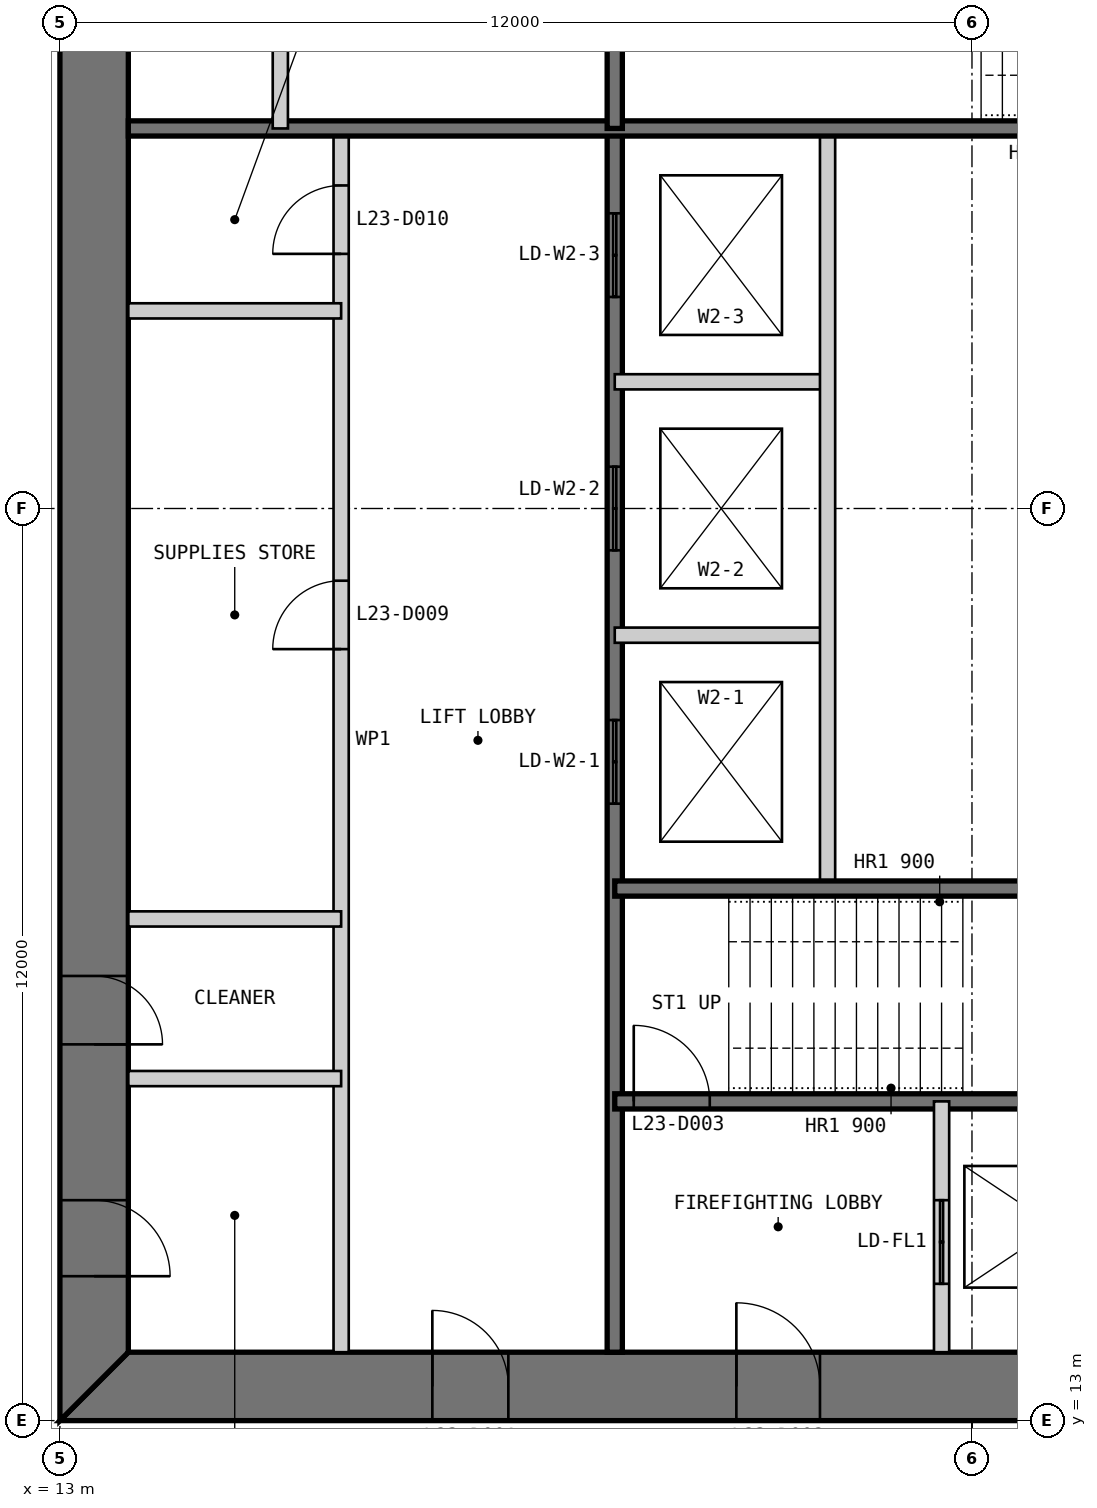
"""IFC4 building model, lengths in metres.
Left out: names, types, materials, properties, quantities, classifications, styles, units other than length and angle.
Written with IfcOpenShell. Run it as: python <this file> out.ifc"""

import sys

from ifc_helpers import new_model, si_unit, direction, frame, frame_2d, origin, place, context, subcontext, project, spatial, polyline, rectangle, outline, extrude, element, fill, save


model = new_model("IFC4")
c1 = context("Model", 3, precision=1e-05, world=origin(), true_north=direction((0.0, 1.0)))
c2 = subcontext(c1, "Body", "Model", "MODEL_VIEW")
j1 = project(units=[si_unit("LENGTHUNIT", "METRE"), si_unit("PLANEANGLEUNIT", "RADIAN")], contexts=[c1])
p1 = place(None, origin())
s1 = spatial("IfcSite", under=j1, at=p1, CompositionType="ELEMENT")
p2 = place(p1, origin())
s2 = spatial("IfcBuilding", under=s1, at=p2, CompositionType="ELEMENT")
p3 = place(p2, frame((0.0, 0.0, 102.4)))
s3 = spatial("IfcBuildingStorey", under=s2, at=p3, CompositionType="ELEMENT", Elevation=102.4)
p4 = place(p3, frame((13.0, 13.45, 0.0), z_axis=(0.0, 0.0, 1.0), x_axis=(1.0, 0.0, 0.0)))
e1 = element("IfcWall", 1, at=p4, inside=s3, PredefinedType="SHEAR", context=c2, shape_type="SweptSolid", body=[
    extrude(outline(polyline([(0.0, -0.45), (24.0, -0.45), (23.1, 0.45), (0.9, 0.45), (0.0, -0.45)])), origin(), (0.0, 0.0, 1.0), 4.0),
])
p5 = place(p4, frame((4.9, 0.0, 0.0)))
e2 = element("IfcOpeningElement", 2, at=p5, cuts=e1, PredefinedType="OPENING", context=c2, shape_type="SweptSolid", body=[
    extrude(rectangle(XDim=1.0, YDim=2.2, at=frame_2d((0.5, 1.1))), frame((0.0, 0.46, 0.0), z_axis=(0.0, -1.0, 0.0), x_axis=(1.0, 0.0, 0.0)), (0.0, 0.0, 1.0), 0.92),
])
p6 = place(p4, frame((8.9, 0.0, 0.0)))
e3 = element("IfcOpeningElement", 3, at=p6, cuts=e1, PredefinedType="OPENING", context=c2, shape_type="SweptSolid", body=[
    extrude(rectangle(XDim=1.1, YDim=2.2, at=frame_2d((0.55, 1.1))), frame((0.0, 0.46, 0.0), z_axis=(0.0, -1.0, 0.0), x_axis=(1.0, 0.0, 0.0)), (0.0, 0.0, 1.0), 0.92),
])
p7 = place(p4, frame((15.05, 0.0, 0.0)))
e4 = element("IfcOpeningElement", 4, at=p7, cuts=e1, PredefinedType="OPENING", context=c2, shape_type="SweptSolid", body=[
    extrude(rectangle(XDim=0.9, YDim=2.2, at=frame_2d((0.45, 1.1))), frame((0.0, 0.46, 0.0), z_axis=(0.0, -1.0, 0.0), x_axis=(1.0, 0.0, 0.0)), (0.0, 0.0, 1.0), 0.92),
])
p8 = place(p4, frame((17.9, 0.0, 0.0)))
e5 = element("IfcOpeningElement", 5, at=p8, cuts=e1, PredefinedType="OPENING", context=c2, shape_type="SweptSolid", body=[
    extrude(rectangle(XDim=1.0, YDim=2.2, at=frame_2d((0.5, 1.1))), frame((0.0, 0.46, 0.0), z_axis=(0.0, -1.0, 0.0), x_axis=(1.0, 0.0, 0.0)), (0.0, 0.0, 1.0), 0.92),
])
p9 = place(p4, frame((21.4, 0.0, 0.0)))
e6 = element("IfcOpeningElement", 6, at=p9, cuts=e1, PredefinedType="OPENING", context=c2, shape_type="SweptSolid", body=[
    extrude(rectangle(XDim=1.0, YDim=2.2, at=frame_2d((0.5, 1.1))), frame((0.0, 0.46, 0.0), z_axis=(0.0, -1.0, 0.0), x_axis=(1.0, 0.0, 0.0)), (0.0, 0.0, 1.0), 0.92),
])
p10 = place(p3, frame((13.45, 36.1, 0.0), z_axis=(0.0, 0.0, 1.0), x_axis=(0.0, -1.0, 0.0)))
e7 = element("IfcWall", 7, at=p10, inside=s3, PredefinedType="SHEAR", context=c2, shape_type="SweptSolid", body=[
    extrude(outline(polyline([(-0.9, -0.45), (23.1, -0.45), (22.2, 0.45), (0.0, 0.45), (-0.9, -0.45)])), origin(), (0.0, 0.0, 1.0), 4.0),
])
p11 = place(p10, frame((20.2, 0.0, 0.0)))
e8 = element("IfcOpeningElement", 8, at=p11, cuts=e7, PredefinedType="OPENING", context=c2, shape_type="SweptSolid", body=[
    extrude(rectangle(XDim=1.0, YDim=2.2, at=frame_2d((0.5, 1.1))), frame((0.0, 0.46, 0.0), z_axis=(0.0, -1.0, 0.0), x_axis=(1.0, 0.0, 0.0)), (0.0, 0.0, 1.0), 0.92),
])
p12 = place(p10, frame((17.25, 0.0, 0.0)))
e9 = element("IfcOpeningElement", 9, at=p12, cuts=e7, PredefinedType="OPENING", context=c2, shape_type="SweptSolid", body=[
    extrude(rectangle(XDim=0.9, YDim=2.2, at=frame_2d((0.45, 1.1))), frame((0.0, 0.46, 0.0), z_axis=(0.0, -1.0, 0.0), x_axis=(1.0, 0.0, 0.0)), (0.0, 0.0, 1.0), 0.92),
])
p13 = place(p3, frame((16.7, 13.9, 0.0), z_axis=(0.0, 0.0, 1.0), x_axis=(0.0, 1.0, 0.0)))
e10 = element("IfcWall", 10, at=p13, inside=s3, PredefinedType="PARTITIONING", context=c2, shape_type="SweptSolid", body=[
    extrude(rectangle(XDim=16.1, YDim=0.2, at=frame_2d((8.05, 0.0))), origin(), (0.0, 0.0, 1.0), 3.8),
])
p14 = place(p13, frame((9.25, 0.0, 0.0)))
e11 = element("IfcOpeningElement", 11, at=p14, cuts=e10, PredefinedType="OPENING", context=c2, shape_type="SweptSolid", body=[
    extrude(rectangle(XDim=0.9, YDim=2.2, at=frame_2d((0.45, 1.1))), frame((0.0, 0.11, 0.0), z_axis=(0.0, -1.0, 0.0), x_axis=(1.0, 0.0, 0.0)), (0.0, 0.0, 1.0), 0.22),
])
p15 = place(p13, frame((14.45, 0.0, 0.0)))
e12 = element("IfcOpeningElement", 12, at=p15, cuts=e10, PredefinedType="OPENING", context=c2, shape_type="SweptSolid", body=[
    extrude(rectangle(XDim=0.9, YDim=2.2, at=frame_2d((0.45, 1.1))), frame((0.0, 0.11, 0.0), z_axis=(0.0, -1.0, 0.0), x_axis=(1.0, 0.0, 0.0)), (0.0, 0.0, 1.0), 0.22),
])
p16 = place(p3, frame((20.3, 13.9, 0.0), z_axis=(0.0, 0.0, 1.0), x_axis=(0.0, 1.0, 0.0)))
e13 = element("IfcWall", 13, at=p16, inside=s3, PredefinedType="SOLIDWALL", context=c2, shape_type="SweptSolid", body=[
    extrude(rectangle(XDim=16.1, YDim=0.2, at=frame_2d((8.05, 0.0))), origin(), (0.0, 0.0, 1.0), 3.8),
])
p17 = place(p16, frame((7.217, 0.0, 0.0)))
e14 = element("IfcOpeningElement", 14, at=p17, cuts=e13, PredefinedType="OPENING", context=c2, shape_type="SweptSolid", body=[
    extrude(rectangle(XDim=1.1, YDim=2.2, at=frame_2d((0.55, 1.1))), frame((0.0, 0.11, 0.0), z_axis=(0.0, -1.0, 0.0), x_axis=(1.0, 0.0, 0.0)), (0.0, 0.0, 1.0), 0.22),
])
p18 = place(p16, frame((10.55, 0.0, 0.0)))
e15 = element("IfcOpeningElement", 15, at=p18, cuts=e13, PredefinedType="OPENING", context=c2, shape_type="SweptSolid", body=[
    extrude(rectangle(XDim=1.1, YDim=2.2, at=frame_2d((0.55, 1.1))), frame((0.0, 0.11, 0.0), z_axis=(0.0, -1.0, 0.0), x_axis=(1.0, 0.0, 0.0)), (0.0, 0.0, 1.0), 0.22),
])
p19 = place(p16, frame((13.883, 0.0, 0.0)))
e16 = element("IfcOpeningElement", 16, at=p19, cuts=e13, PredefinedType="OPENING", context=c2, shape_type="SweptSolid", body=[
    extrude(rectangle(XDim=1.1, YDim=2.2, at=frame_2d((0.55, 1.1))), frame((0.0, 0.11, 0.0), z_axis=(0.0, -1.0, 0.0), x_axis=(1.0, 0.0, 0.0)), (0.0, 0.0, 1.0), 0.22),
])
for number, where, z_axis, x_axis in (
    (17, (20.3, 23.333, 0.0), (0.0, 0.0, 1.0), (1.0, 0.0, 0.0)),
    (18, (20.3, 26.667, 0.0), (0.0, 0.0, 1.0), (1.0, 0.0, 0.0)),
):
    element("IfcWall", number, at=place(p3, frame(where, z_axis=z_axis, x_axis=x_axis)), inside=s3, PredefinedType="PARTITIONING", context=c2, shape_type="SweptSolid", body=[
        extrude(rectangle(XDim=2.8, YDim=0.2, at=frame_2d((1.4, 0.0))), origin(), (0.0, 0.0, 1.0), 3.8),
    ])
p20 = place(p3, frame((23.1, 20.0, 0.0), z_axis=(0.0, 0.0, 1.0), x_axis=(0.0, 1.0, 0.0)))
e19 = element("IfcWall", 19, at=p20, inside=s3, PredefinedType="PARTITIONING", context=c2, shape_type="SweptSolid", body=[
    extrude(rectangle(XDim=10.0, YDim=0.2, at=frame_2d((5.0, 0.0))), origin(), (0.0, 0.0, 1.0), 3.8),
])
p21 = place(p3, frame((20.3, 17.2, 0.0), z_axis=(0.0, 0.0, 1.0), x_axis=(1.0, 0.0, 0.0)))
e20 = element("IfcWall", 20, at=p21, inside=s3, PredefinedType="SOLIDWALL", context=c2, shape_type="SweptSolid", body=[
    extrude(rectangle(XDim=9.4, YDim=0.2, at=frame_2d((4.7, 0.0))), origin(), (0.0, 0.0, 1.0), 3.8),
])
p22 = place(p21, frame((0.25, 0.0, 0.0)))
e21 = element("IfcOpeningElement", 21, at=p22, cuts=e20, PredefinedType="OPENING", context=c2, shape_type="SweptSolid", body=[
    extrude(rectangle(XDim=1.0, YDim=2.2, at=frame_2d((0.5, 1.1))), frame((0.0, 0.11, 0.0), z_axis=(0.0, -1.0, 0.0), x_axis=(1.0, 0.0, 0.0)), (0.0, 0.0, 1.0), 0.22),
])
p23 = place(p3, frame((20.3, 20.0, 0.0), z_axis=(0.0, 0.0, 1.0), x_axis=(1.0, 0.0, 0.0)))
e22 = element("IfcWall", 22, at=p23, inside=s3, PredefinedType="SOLIDWALL", context=c2, shape_type="SweptSolid", body=[
    extrude(rectangle(XDim=15.8, YDim=0.2, at=frame_2d((7.9, 0.0))), origin(), (0.0, 0.0, 1.0), 3.8),
])
p24 = place(p3, frame((24.6, 13.9, 0.0), z_axis=(0.0, 0.0, 1.0), x_axis=(0.0, 1.0, 0.0)))
e23 = element("IfcWall", 23, at=p24, inside=s3, PredefinedType="PARTITIONING", context=c2, shape_type="SweptSolid", body=[
    extrude(rectangle(XDim=3.3, YDim=0.2, at=frame_2d((1.65, 0.0))), origin(), (0.0, 0.0, 1.0), 3.8),
])
p25 = place(p24, frame((0.9, 0.0, 0.0)))
e24 = element("IfcOpeningElement", 24, at=p25, cuts=e23, PredefinedType="OPENING", context=c2, shape_type="SweptSolid", body=[
    extrude(rectangle(XDim=1.1, YDim=2.2, at=frame_2d((0.55, 1.1))), frame((0.0, 0.11, 0.0), z_axis=(0.0, -1.0, 0.0), x_axis=(1.0, 0.0, 0.0)), (0.0, 0.0, 1.0), 0.22),
])
for number, where, z_axis, x_axis in (
    (25, (13.9, 17.5, 0.0), (0.0, 0.0, 1.0), (1.0, 0.0, 0.0)),
    (26, (13.9, 19.6, 0.0), (0.0, 0.0, 1.0), (1.0, 0.0, 0.0)),
    (27, (13.9, 27.6, 0.0), (0.0, 0.0, 1.0), (1.0, 0.0, 0.0)),
):
    element("IfcWall", number, at=place(p3, frame(where, z_axis=z_axis, x_axis=x_axis)), inside=s3, PredefinedType="PARTITIONING", context=c2, shape_type="SweptSolid", body=[
        extrude(rectangle(XDim=2.8, YDim=0.2, at=frame_2d((1.4, 0.0))), origin(), (0.0, 0.0, 1.0), 3.8),
    ])
p26 = place(p3, frame((29.7, 30.0, 0.0), z_axis=(0.0, 0.0, 1.0), x_axis=(-1.0, 0.0, 0.0)))
e28 = element("IfcWall", 28, at=p26, inside=s3, PredefinedType="SOLIDWALL", context=c2, shape_type="SweptSolid", body=[
    extrude(rectangle(XDim=15.8, YDim=0.2, at=frame_2d((7.9, 0.0))), origin(), (0.0, 0.0, 1.0), 3.8),
])
p27 = place(p3, frame((20.3, 36.1, 0.0), z_axis=(0.0, 0.0, 1.0), x_axis=(0.0, -1.0, 0.0)))
e29 = element("IfcWall", 29, at=p27, inside=s3, PredefinedType="SOLIDWALL", context=c2, shape_type="SweptSolid", body=[
    extrude(rectangle(XDim=6.1, YDim=0.2, at=frame_2d((3.05, 0.0))), origin(), (0.0, 0.0, 1.0), 3.8),
])
p28 = place(p3, frame((15.9, 36.1, 0.0), z_axis=(0.0, 0.0, 1.0), x_axis=(0.0, -1.0, 0.0)))
e30 = element("IfcWall", 30, at=p28, inside=s3, PredefinedType="PARTITIONING", context=c2, shape_type="SweptSolid", body=[
    extrude(rectangle(XDim=6.1, YDim=0.2, at=frame_2d((3.05, 0.0))), origin(), (0.0, 0.0, 1.0), 3.8),
])
p29 = place(p5, origin())
e31 = element("IfcDoor", 31, at=p29, inside=s3, OperationType="SINGLE_SWING_LEFT", PredefinedType="DOOR", context=c2, shape_type="SweptSolid", body=[
    extrude(rectangle(XDim=1.0, YDim=2.2, at=frame_2d((0.5, 1.1))), frame((0.0, 0.025, 0.0), z_axis=(0.0, -1.0, 0.0), x_axis=(1.0, 0.0, 0.0)), (0.0, 0.0, 1.0), 0.05),
    extrude(outline(polyline([(0.0, 0.0), (0.04, 0.0), (0.04, 2.16), (0.96, 2.16), (0.96, 0.0), (1.0, 0.0), (1.0, 2.2), (0.0, 2.2), (0.0, 0.0)])), frame((0.0, 0.3, 0.0), z_axis=(0.0, -1.0, 0.0), x_axis=(1.0, 0.0, 0.0)), (0.0, 0.0, 1.0), 0.6),
])
fill(e2, e31)
p30 = place(p6, origin())
e32 = element("IfcDoor", 32, at=p30, inside=s3, OperationType="SINGLE_SWING_LEFT", PredefinedType="DOOR", context=c2, shape_type="SweptSolid", body=[
    extrude(rectangle(XDim=1.1, YDim=2.2, at=frame_2d((0.55, 1.1))), frame((0.0, 0.025, 0.0), z_axis=(0.0, -1.0, 0.0), x_axis=(1.0, 0.0, 0.0)), (0.0, 0.0, 1.0), 0.05),
    extrude(outline(polyline([(0.0, 0.0), (0.04, 0.0), (0.04, 2.16), (1.06, 2.16), (1.06, 0.0), (1.1, 0.0), (1.1, 2.2), (0.0, 2.2), (0.0, 0.0)])), frame((0.0, 0.3, 0.0), z_axis=(0.0, -1.0, 0.0), x_axis=(1.0, 0.0, 0.0)), (0.0, 0.0, 1.0), 0.6),
])
fill(e3, e32)
p31 = place(p22, origin())
e33 = element("IfcDoor", 33, at=p31, inside=s3, OperationType="SINGLE_SWING_LEFT", PredefinedType="DOOR", context=c2, shape_type="SweptSolid", body=[
    extrude(rectangle(XDim=1.0, YDim=2.2, at=frame_2d((0.5, 1.1))), frame((0.0, 0.025, 0.0), z_axis=(0.0, -1.0, 0.0), x_axis=(1.0, 0.0, 0.0)), (0.0, 0.0, 1.0), 0.05),
])
fill(e21, e33)
p32 = place(p11, origin())
e34 = element("IfcDoor", 34, at=p32, inside=s3, OperationType="SINGLE_SWING_RIGHT", PredefinedType="DOOR", context=c2, shape_type="SweptSolid", body=[
    extrude(rectangle(XDim=1.0, YDim=2.2, at=frame_2d((0.5, 1.1))), frame((0.0, 0.025, 0.0), z_axis=(0.0, -1.0, 0.0), x_axis=(1.0, 0.0, 0.0)), (0.0, 0.0, 1.0), 0.05),
    extrude(outline(polyline([(0.0, 0.0), (0.04, 0.0), (0.04, 2.16), (0.96, 2.16), (0.96, 0.0), (1.0, 0.0), (1.0, 2.2), (0.0, 2.2), (0.0, 0.0)])), frame((0.0, 0.3, 0.0), z_axis=(0.0, -1.0, 0.0), x_axis=(1.0, 0.0, 0.0)), (0.0, 0.0, 1.0), 0.6),
])
fill(e8, e34)
p33 = place(p12, origin())
e35 = element("IfcDoor", 35, at=p33, inside=s3, OperationType="SINGLE_SWING_RIGHT", PredefinedType="DOOR", context=c2, shape_type="SweptSolid", body=[
    extrude(rectangle(XDim=0.9, YDim=2.2, at=frame_2d((0.45, 1.1))), frame((0.0, 0.025, 0.0), z_axis=(0.0, -1.0, 0.0), x_axis=(1.0, 0.0, 0.0)), (0.0, 0.0, 1.0), 0.05),
    extrude(outline(polyline([(0.0, 0.0), (0.04, 0.0), (0.04, 2.16), (0.86, 2.16), (0.86, 0.0), (0.9, 0.0), (0.9, 2.2), (0.0, 2.2), (0.0, 0.0)])), frame((0.0, 0.3, 0.0), z_axis=(0.0, -1.0, 0.0), x_axis=(1.0, 0.0, 0.0)), (0.0, 0.0, 1.0), 0.6),
])
fill(e9, e35)
p34 = place(p14, origin())
e36 = element("IfcDoor", 36, at=p34, inside=s3, OperationType="SINGLE_SWING_LEFT", PredefinedType="DOOR", context=c2, shape_type="SweptSolid", body=[
    extrude(rectangle(XDim=0.9, YDim=2.2, at=frame_2d((0.45, 1.1))), frame((0.0, 0.025, 0.0), z_axis=(0.0, -1.0, 0.0), x_axis=(1.0, 0.0, 0.0)), (0.0, 0.0, 1.0), 0.05),
])
fill(e11, e36)
p35 = place(p15, origin())
e37 = element("IfcDoor", 37, at=p35, inside=s3, OperationType="SINGLE_SWING_LEFT", PredefinedType="DOOR", context=c2, shape_type="SweptSolid", body=[
    extrude(rectangle(XDim=0.9, YDim=2.2, at=frame_2d((0.45, 1.1))), frame((0.0, 0.025, 0.0), z_axis=(0.0, -1.0, 0.0), x_axis=(1.0, 0.0, 0.0)), (0.0, 0.0, 1.0), 0.05),
])
fill(e12, e37)
p36 = place(p25, origin())
e38 = element("IfcDoor", 38, at=p36, inside=s3, OperationType="DOUBLE_DOOR_SLIDING", PredefinedType="DOOR", context=c2, shape_type="SweptSolid", body=[
    extrude(rectangle(XDim=1.1, YDim=2.2, at=frame_2d((0.55, 1.1))), frame((0.0, 0.025, 0.0), z_axis=(0.0, -1.0, 0.0), x_axis=(1.0, 0.0, 0.0)), (0.0, 0.0, 1.0), 0.05),
])
fill(e24, e38)
p37 = place(p17, origin())
e39 = element("IfcDoor", 39, at=p37, inside=s3, OperationType="DOUBLE_DOOR_SLIDING", PredefinedType="DOOR", context=c2, shape_type="SweptSolid", body=[
    extrude(rectangle(XDim=1.1, YDim=2.2, at=frame_2d((0.55, 1.1))), frame((0.0, 0.025, 0.0), z_axis=(0.0, -1.0, 0.0), x_axis=(1.0, 0.0, 0.0)), (0.0, 0.0, 1.0), 0.05),
])
fill(e14, e39)
p38 = place(p18, origin())
e40 = element("IfcDoor", 40, at=p38, inside=s3, OperationType="DOUBLE_DOOR_SLIDING", PredefinedType="DOOR", context=c2, shape_type="SweptSolid", body=[
    extrude(rectangle(XDim=1.1, YDim=2.2, at=frame_2d((0.55, 1.1))), frame((0.0, 0.025, 0.0), z_axis=(0.0, -1.0, 0.0), x_axis=(1.0, 0.0, 0.0)), (0.0, 0.0, 1.0), 0.05),
])
fill(e15, e40)
p39 = place(p19, origin())
e41 = element("IfcDoor", 41, at=p39, inside=s3, OperationType="DOUBLE_DOOR_SLIDING", PredefinedType="DOOR", context=c2, shape_type="SweptSolid", body=[
    extrude(rectangle(XDim=1.1, YDim=2.2, at=frame_2d((0.55, 1.1))), frame((0.0, 0.025, 0.0), z_axis=(0.0, -1.0, 0.0), x_axis=(1.0, 0.0, 0.0)), (0.0, 0.0, 1.0), 0.05),
])
fill(e16, e41)
save(model, sys.argv[1])
